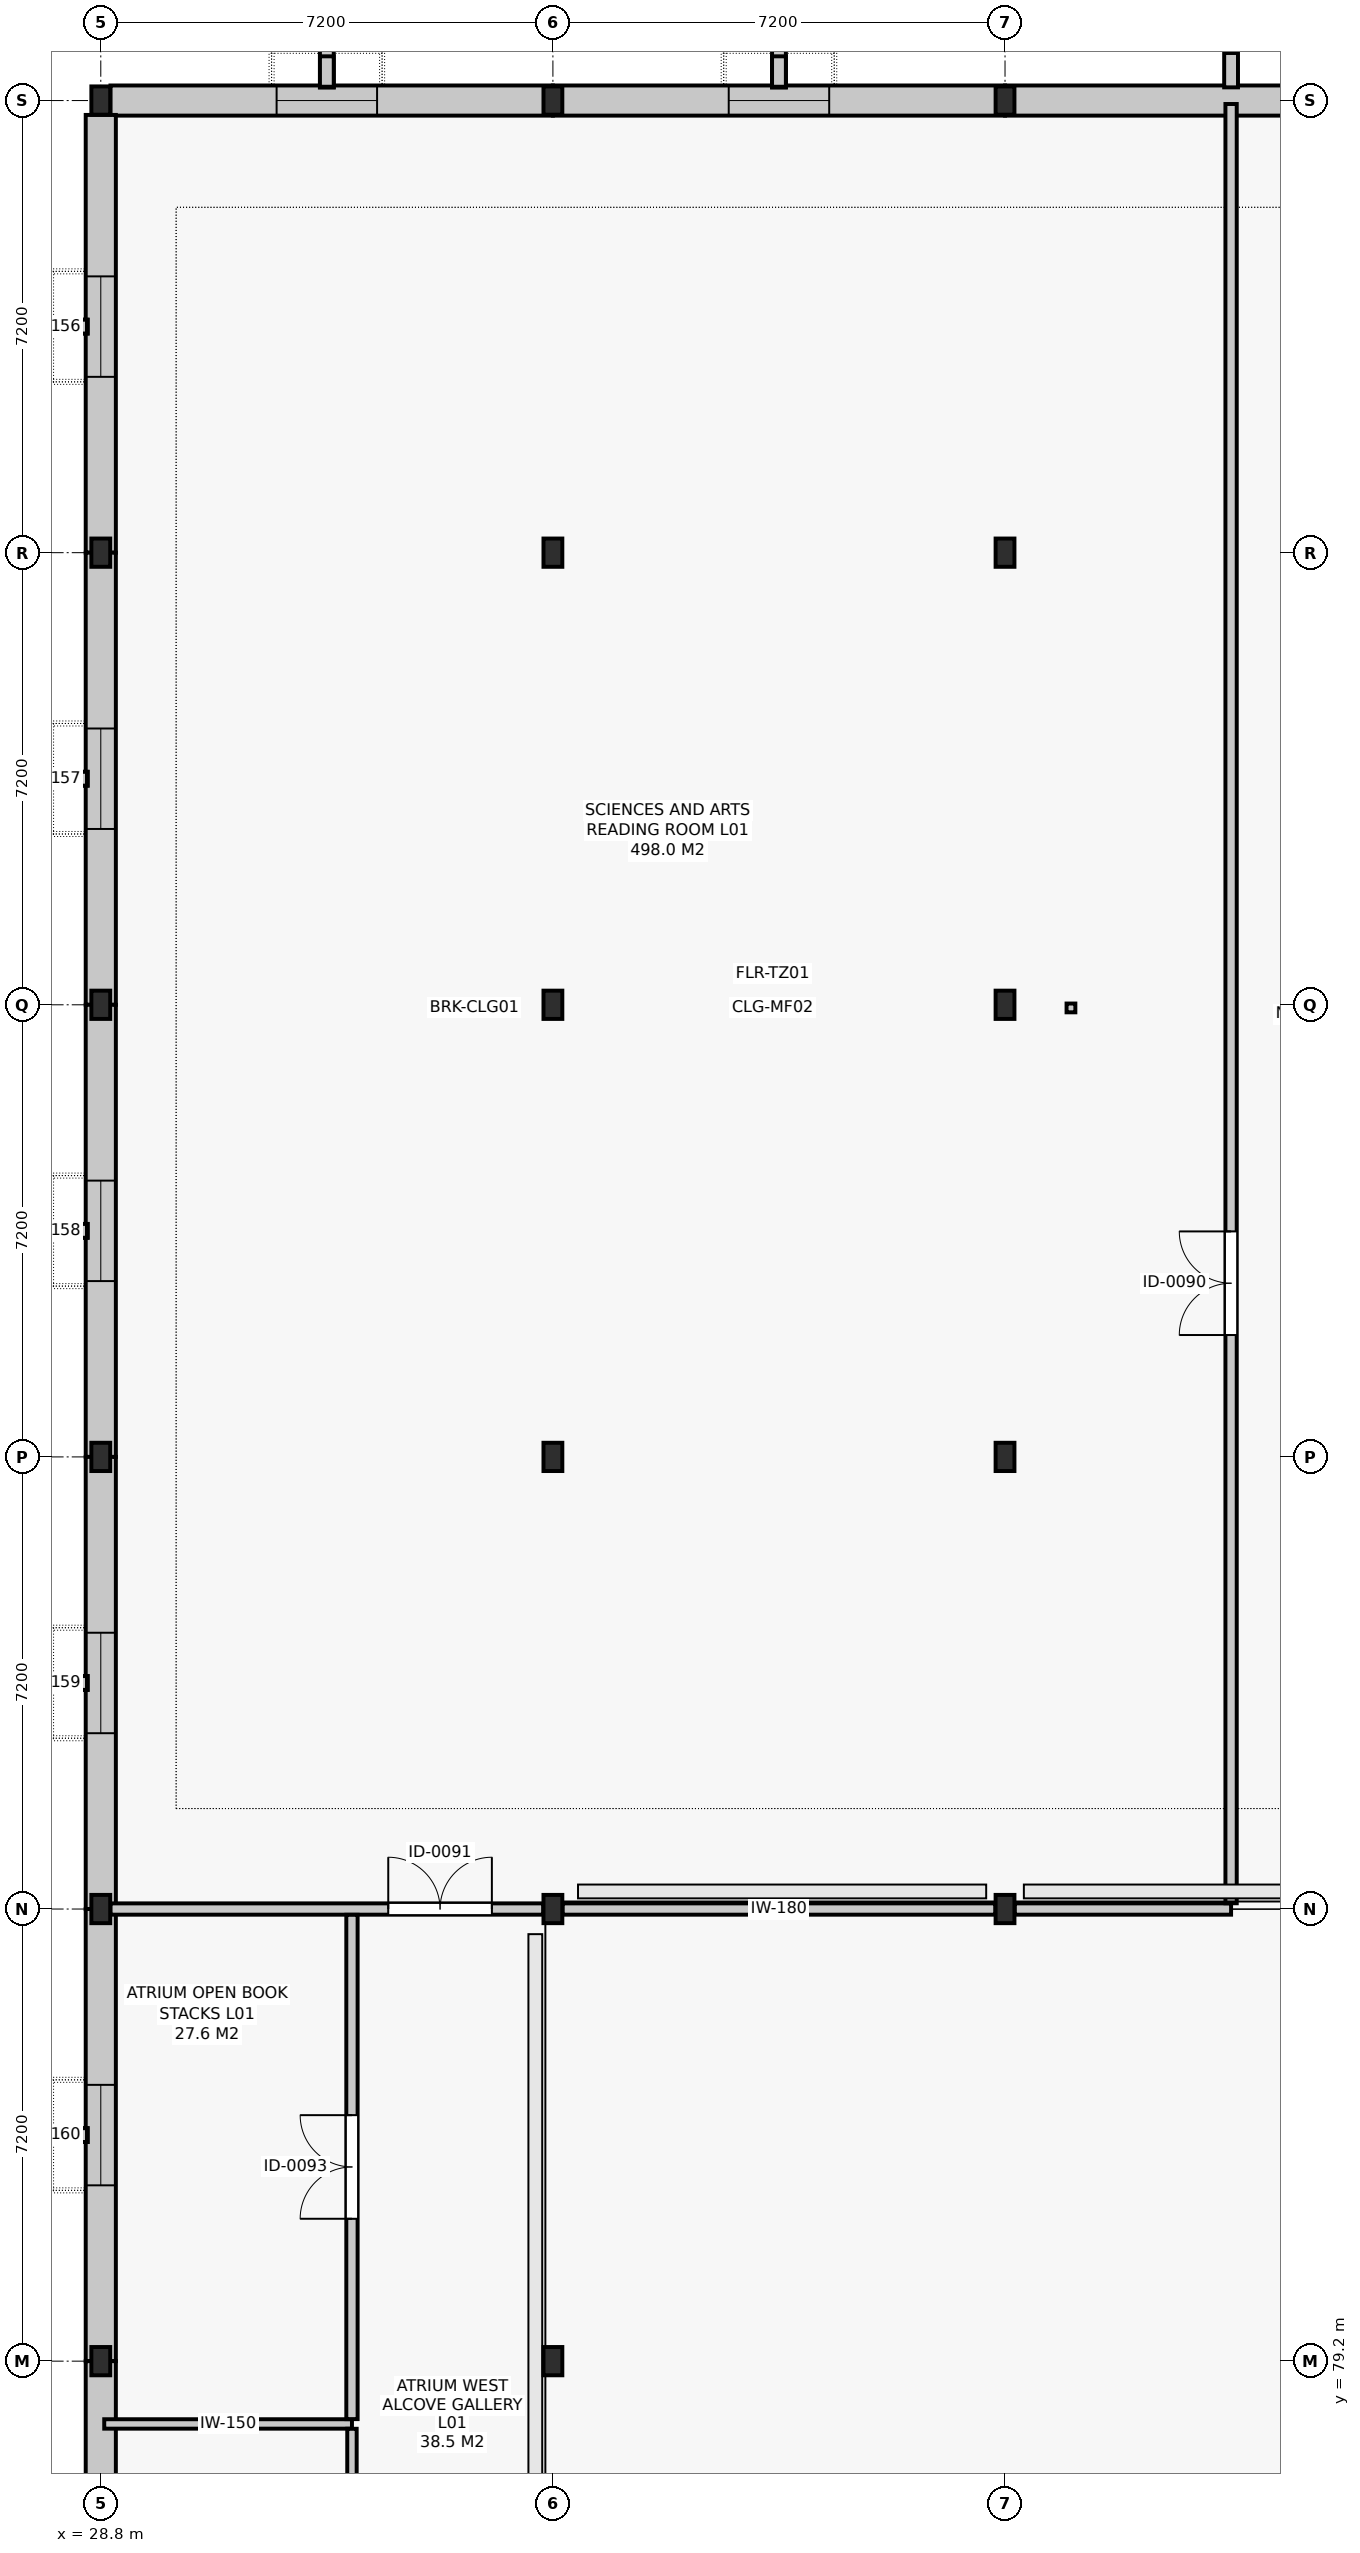
"""IFC4 building model, lengths in metres.
Left out: names, types, materials, properties, quantities, classifications, styles, units other than length and angle.
Written with IfcOpenShell. Run it as: python <this file> out.ifc"""

import sys

from ifc_helpers import new_model, si_unit, direction, frame, frame_2d, origin, origin_2d, place, context, subcontext, project, spatial, rectangle, i_section, extrude, element, fill, save


model = new_model("IFC4")
c1 = context("Model", 3, precision=1e-05, world=origin(), true_north=direction((0.0, 1.0)))
c2 = subcontext(c1, "Body", "Model", "MODEL_VIEW")
j1 = project(units=[si_unit("LENGTHUNIT", "METRE"), si_unit("PLANEANGLEUNIT", "RADIAN")], contexts=[c1])
p1 = place(None, origin())
s1 = spatial("IfcSite", under=j1, at=p1, CompositionType="ELEMENT")
p2 = place(p1, origin())
s2 = spatial("IfcBuilding", under=s1, at=p2, CompositionType="ELEMENT")
p3 = place(p2, frame((0.0, 0.0, 5.4)))
s3 = spatial("IfcBuildingStorey", under=s2, at=p3, CompositionType="ELEMENT", Elevation=5.4)
for number, where, z_axis, x_axis in (
    (1, (28.8, 79.2, 0.0), (0.0, 0.0, 1.0), (1.0, 0.0, 0.0)),
    (2, (28.8, 86.4, 0.0), (0.0, 0.0, 1.0), (1.0, 0.0, 0.0)),
    (3, (28.8, 93.6, 0.0), (0.0, 0.0, 1.0), (1.0, 0.0, 0.0)),
    (4, (28.8, 100.8, 0.0), (0.0, 0.0, 1.0), (1.0, 0.0, 0.0)),
    (5, (28.8, 108.0, 0.0), (0.0, 0.0, 1.0), (1.0, 0.0, 0.0)),
    (6, (28.8, 115.2, 0.0), (0.0, 0.0, 1.0), (1.0, 0.0, 0.0)),
    (7, (36.0, 79.2, 0.0), (0.0, 0.0, 1.0), (1.0, 0.0, 0.0)),
    (8, (36.0, 86.4, 0.0), (0.0, 0.0, 1.0), (1.0, 0.0, 0.0)),
    (9, (36.0, 93.6, 0.0), (0.0, 0.0, 1.0), (1.0, 0.0, 0.0)),
    (10, (36.0, 100.8, 0.0), (0.0, 0.0, 1.0), (1.0, 0.0, 0.0)),
    (11, (36.0, 108.0, 0.0), (0.0, 0.0, 1.0), (1.0, 0.0, 0.0)),
    (12, (36.0, 115.2, 0.0), (0.0, 0.0, 1.0), (1.0, 0.0, 0.0)),
    (13, (43.2, 86.4, 0.0), (0.0, 0.0, 1.0), (1.0, 0.0, 0.0)),
    (14, (43.2, 93.6, 0.0), (0.0, 0.0, 1.0), (1.0, 0.0, 0.0)),
    (15, (43.2, 100.8, 0.0), (0.0, 0.0, 1.0), (1.0, 0.0, 0.0)),
    (16, (43.2, 108.0, 0.0), (0.0, 0.0, 1.0), (1.0, 0.0, 0.0)),
    (17, (43.2, 115.2, 0.0), (0.0, 0.0, 1.0), (1.0, 0.0, 0.0)),
):
    element("IfcColumn", number, at=place(p3, frame(where, z_axis=z_axis, x_axis=x_axis)), inside=s3, PredefinedType="COLUMN", context=c2, shape_type="SweptSolid", body=[
        extrude(i_section(OverallWidth=0.3, OverallDepth=0.45, WebThickness=0.014, FlangeThickness=0.026, FilletRadius=0.027, at=origin_2d()), origin(), (0.0, 0.0, 1.0), 4.8),
    ])
p4 = place(p3, frame((50.4, 115.2, 0.0), z_axis=(0.0, 0.0, 1.0), x_axis=(-1.0, 0.0, 0.0)))
e18 = element("IfcWall", 18, at=p4, inside=s3, PredefinedType="SOLIDWALL", context=c2, shape_type="SweptSolid", body=[
    extrude(rectangle(XDim=7.2, YDim=0.48, at=frame_2d((3.6, 0.0))), origin(), (0.0, 0.0, 1.0), 3.8),
])
p5 = place(p3, frame((43.2, 115.2, 0.0), z_axis=(0.0, 0.0, 1.0), x_axis=(-1.0, 0.0, 0.0)))
e19 = element("IfcWall", 19, at=p5, inside=s3, PredefinedType="SOLIDWALL", context=c2, shape_type="SweptSolid", body=[
    extrude(rectangle(XDim=7.2, YDim=0.48, at=frame_2d((3.6, 0.0))), origin(), (0.0, 0.0, 1.0), 3.8),
])
p6 = place(p5, frame((2.8, 0.0, 0.95)))
e20 = element("IfcOpeningElement", 20, at=p6, cuts=e19, PredefinedType="OPENING", context=c2, shape_type="SweptSolid", body=[
    extrude(rectangle(XDim=1.6, YDim=2.2, at=frame_2d((0.8, 1.1))), frame((0.0, 0.252, 0.0), z_axis=(0.0, -1.0, 0.0), x_axis=(1.0, 0.0, 0.0)), (0.0, 0.0, 1.0), 0.504),
])
p7 = place(p3, frame((36.0, 115.2, 0.0), z_axis=(0.0, 0.0, 1.0), x_axis=(-1.0, 0.0, 0.0)))
e21 = element("IfcWall", 21, at=p7, inside=s3, PredefinedType="SOLIDWALL", context=c2, shape_type="SweptSolid", body=[
    extrude(rectangle(XDim=7.046, YDim=0.48, at=frame_2d((3.523, 0.0))), origin(), (0.0, 0.0, 1.0), 3.8),
])
p8 = place(p7, frame((2.8, 0.0, 0.95)))
e22 = element("IfcOpeningElement", 22, at=p8, cuts=e21, PredefinedType="OPENING", context=c2, shape_type="SweptSolid", body=[
    extrude(rectangle(XDim=1.6, YDim=2.2, at=frame_2d((0.8, 1.1))), frame((0.0, 0.252, 0.0), z_axis=(0.0, -1.0, 0.0), x_axis=(1.0, 0.0, 0.0)), (0.0, 0.0, 1.0), 0.504),
])
p9 = place(p3, frame((28.8, 114.971, 0.0), z_axis=(0.0, 0.0, 1.0), x_axis=(0.0, -1.0, 0.0)))
e23 = element("IfcWall", 23, at=p9, inside=s3, PredefinedType="SOLIDWALL", context=c2, shape_type="SweptSolid", body=[
    extrude(rectangle(XDim=6.971, YDim=0.48, at=frame_2d((3.485, 0.0))), origin(), (0.0, 0.0, 1.0), 3.8),
])
p10 = place(p9, frame((2.571, 0.0, 0.95)))
e24 = element("IfcOpeningElement", 24, at=p10, cuts=e23, PredefinedType="OPENING", context=c2, shape_type="SweptSolid", body=[
    extrude(rectangle(XDim=1.6, YDim=2.2, at=frame_2d((0.8, 1.1))), frame((0.0, 0.252, 0.0), z_axis=(0.0, -1.0, 0.0), x_axis=(1.0, 0.0, 0.0)), (0.0, 0.0, 1.0), 0.504),
])
p11 = place(p3, frame((28.8, 108.0, 0.0), z_axis=(0.0, 0.0, 1.0), x_axis=(0.0, -1.0, 0.0)))
e25 = element("IfcWall", 25, at=p11, inside=s3, PredefinedType="SOLIDWALL", context=c2, shape_type="SweptSolid", body=[
    extrude(rectangle(XDim=7.2, YDim=0.48, at=frame_2d((3.6, 0.0))), origin(), (0.0, 0.0, 1.0), 3.8),
])
p12 = place(p11, frame((2.8, 0.0, 0.95)))
e26 = element("IfcOpeningElement", 26, at=p12, cuts=e25, PredefinedType="OPENING", context=c2, shape_type="SweptSolid", body=[
    extrude(rectangle(XDim=1.6, YDim=2.2, at=frame_2d((0.8, 1.1))), frame((0.0, 0.252, 0.0), z_axis=(0.0, -1.0, 0.0), x_axis=(1.0, 0.0, 0.0)), (0.0, 0.0, 1.0), 0.504),
])
p13 = place(p3, frame((28.8, 100.8, 0.0), z_axis=(0.0, 0.0, 1.0), x_axis=(0.0, -1.0, 0.0)))
e27 = element("IfcWall", 27, at=p13, inside=s3, PredefinedType="SOLIDWALL", context=c2, shape_type="SweptSolid", body=[
    extrude(rectangle(XDim=7.2, YDim=0.48, at=frame_2d((3.6, 0.0))), origin(), (0.0, 0.0, 1.0), 3.8),
])
p14 = place(p13, frame((2.8, 0.0, 0.95)))
e28 = element("IfcOpeningElement", 28, at=p14, cuts=e27, PredefinedType="OPENING", context=c2, shape_type="SweptSolid", body=[
    extrude(rectangle(XDim=1.6, YDim=2.2, at=frame_2d((0.8, 1.1))), frame((0.0, 0.252, 0.0), z_axis=(0.0, -1.0, 0.0), x_axis=(1.0, 0.0, 0.0)), (0.0, 0.0, 1.0), 0.504),
])
p15 = place(p3, frame((28.8, 93.6, 0.0), z_axis=(0.0, 0.0, 1.0), x_axis=(0.0, -1.0, 0.0)))
e29 = element("IfcWall", 29, at=p15, inside=s3, PredefinedType="SOLIDWALL", context=c2, shape_type="SweptSolid", body=[
    extrude(rectangle(XDim=7.2, YDim=0.48, at=frame_2d((3.6, 0.0))), origin(), (0.0, 0.0, 1.0), 3.8),
])
p16 = place(p15, frame((2.8, 0.0, 0.95)))
e30 = element("IfcOpeningElement", 30, at=p16, cuts=e29, PredefinedType="OPENING", context=c2, shape_type="SweptSolid", body=[
    extrude(rectangle(XDim=1.6, YDim=2.2, at=frame_2d((0.8, 1.1))), frame((0.0, 0.252, 0.0), z_axis=(0.0, -1.0, 0.0), x_axis=(1.0, 0.0, 0.0)), (0.0, 0.0, 1.0), 0.504),
])
p17 = place(p3, frame((28.8, 86.4, 0.0), z_axis=(0.0, 0.0, 1.0), x_axis=(0.0, -1.0, 0.0)))
e31 = element("IfcWall", 31, at=p17, inside=s3, PredefinedType="SOLIDWALL", context=c2, shape_type="SweptSolid", body=[
    extrude(rectangle(XDim=7.2, YDim=0.48, at=frame_2d((3.6, 0.0))), origin(), (0.0, 0.0, 1.0), 3.8),
])
p18 = place(p17, frame((2.8, 0.0, 0.95)))
e32 = element("IfcOpeningElement", 32, at=p18, cuts=e31, PredefinedType="OPENING", context=c2, shape_type="SweptSolid", body=[
    extrude(rectangle(XDim=1.6, YDim=2.2, at=frame_2d((0.8, 1.1))), frame((0.0, 0.252, 0.0), z_axis=(0.0, -1.0, 0.0), x_axis=(1.0, 0.0, 0.0)), (0.0, 0.0, 1.0), 0.504),
])
p19 = place(p3, frame((28.8, 79.2, 0.0), z_axis=(0.0, 0.0, 1.0), x_axis=(0.0, -1.0, 0.0)))
e33 = element("IfcWall", 33, at=p19, inside=s3, PredefinedType="SOLIDWALL", context=c2, shape_type="SweptSolid", body=[
    extrude(rectangle(XDim=7.2, YDim=0.48, at=frame_2d((3.6, 0.0))), origin(), (0.0, 0.0, 1.0), 3.8),
])
p20 = place(p19, frame((2.8, 0.0, 0.95)))
e34 = element("IfcOpeningElement", 34, at=p20, cuts=e33, PredefinedType="OPENING", context=c2, shape_type="SweptSolid", body=[
    extrude(rectangle(XDim=1.6, YDim=2.2, at=frame_2d((0.8, 1.1))), frame((0.0, 0.252, 0.0), z_axis=(0.0, -1.0, 0.0), x_axis=(1.0, 0.0, 0.0)), (0.0, 0.0, 1.0), 0.504),
])
p21 = place(p3, frame((28.855, 78.2, 0.0), z_axis=(0.0, 0.0, 1.0), x_axis=(1.0, 0.0, 0.0)))
e35 = element("IfcWall", 35, at=p21, inside=s3, PredefinedType="PARTITIONING", context=c2, shape_type="SweptSolid", body=[
    extrude(rectangle(XDim=3.945, YDim=0.15, at=frame_2d((1.973, 0.0))), origin(), (0.0, 0.0, 1.0), 3.955),
])
p22 = place(p3, frame((28.954, 86.4, 0.0), z_axis=(0.0, 0.0, 1.0), x_axis=(1.0, 0.0, 0.0)))
e36 = element("IfcWall", 36, at=p22, inside=s3, PredefinedType="PARTITIONING", context=c2, shape_type="SweptSolid", body=[
    extrude(rectangle(XDim=6.892, YDim=0.18, at=frame_2d((3.446, 0.0))), origin(), (0.0, 0.0, 1.0), 4.065),
])
p23 = place(p22, frame((4.424, 0.0, 0.0)))
e37 = element("IfcOpeningElement", 37, at=p23, cuts=e36, PredefinedType="OPENING", context=c2, shape_type="SweptSolid", body=[
    extrude(rectangle(XDim=1.65, YDim=2.25, at=frame_2d((0.825, 1.125))), frame((0.0, 0.102, 0.0), z_axis=(0.0, -1.0, 0.0), x_axis=(1.0, 0.0, 0.0)), (0.0, 0.0, 1.0), 0.204),
])
p24 = place(p3, frame((36.154, 86.4, 0.0), z_axis=(0.0, 0.0, 1.0), x_axis=(1.0, 0.0, 0.0)))
e38 = element("IfcWall", 38, at=p24, inside=s3, PredefinedType="PARTITIONING", context=c2, shape_type="SweptSolid", body=[
    extrude(rectangle(XDim=6.892, YDim=0.18, at=frame_2d((3.446, 0.0))), origin(), (0.0, 0.0, 1.0), 4.505),
])
p25 = place(p3, frame((43.354, 86.4, 0.0), z_axis=(0.0, 0.0, 1.0), x_axis=(1.0, 0.0, 0.0)))
e39 = element("IfcWall", 39, at=p25, inside=s3, PredefinedType="PARTITIONING", context=c2, shape_type="SweptSolid", body=[
    extrude(rectangle(XDim=3.446, YDim=0.18, at=frame_2d((1.723, 0.0))), origin(), (0.0, 0.0, 1.0), 4.505),
])
p26 = place(p3, frame((32.8, 72.077, 0.0), z_axis=(0.0, 0.0, 1.0), x_axis=(0.0, 1.0, 0.0)))
e40 = element("IfcWall", 40, at=p26, inside=s3, PredefinedType="PARTITIONING", context=c2, shape_type="SweptSolid", body=[
    extrude(rectangle(XDim=6.046, YDim=0.15, at=frame_2d((3.023, 0.0))), origin(), (0.0, 0.0, 1.0), 4.065),
])
p27 = place(p26, frame((2.533, 0.0, 0.0)))
e41 = element("IfcOpeningElement", 41, at=p27, cuts=e40, PredefinedType="OPENING", context=c2, shape_type="SweptSolid", body=[
    extrude(rectangle(XDim=0.98, YDim=2.1, at=frame_2d((0.49, 1.05))), frame((0.0, 0.087, 0.0), z_axis=(0.0, -1.0, 0.0), x_axis=(1.0, 0.0, 0.0)), (0.0, 0.0, 1.0), 0.174),
])
p28 = place(p3, frame((46.8, 86.492, 0.0), z_axis=(0.0, 0.0, 1.0), x_axis=(0.0, 1.0, 0.0)))
e42 = element("IfcWall", 42, at=p28, inside=s3, PredefinedType="PARTITIONING", context=c2, shape_type="SweptSolid", body=[
    extrude(rectangle(XDim=28.653, YDim=0.18, at=frame_2d((14.327, 0.0))), origin(), (0.0, 0.0, 1.0), 3.955),
])
p29 = place(p28, frame((9.049, 0.0, 0.0)))
e43 = element("IfcOpeningElement", 43, at=p29, cuts=e42, PredefinedType="OPENING", context=c2, shape_type="SweptSolid", body=[
    extrude(rectangle(XDim=1.65, YDim=2.25, at=frame_2d((0.825, 1.125))), frame((0.0, 0.102, 0.0), z_axis=(0.0, -1.0, 0.0), x_axis=(1.0, 0.0, 0.0)), (0.0, 0.0, 1.0), 0.204),
])
p30 = place(p3, frame((32.8, 78.277, 0.0), z_axis=(0.0, 0.0, 1.0), x_axis=(0.0, 1.0, 0.0)))
e44 = element("IfcWall", 44, at=p30, inside=s3, PredefinedType="PARTITIONING", context=c2, shape_type="SweptSolid", body=[
    extrude(rectangle(XDim=8.031, YDim=0.18, at=frame_2d((4.016, 0.0))), origin(), (0.0, 0.0, 1.0), 4.065),
])
p31 = place(p30, frame((3.19, 0.0, 0.0)))
e45 = element("IfcOpeningElement", 45, at=p31, cuts=e44, PredefinedType="OPENING", context=c2, shape_type="SweptSolid", body=[
    extrude(rectangle(XDim=1.65, YDim=2.25, at=frame_2d((0.825, 1.125))), frame((0.0, 0.102, 0.0), z_axis=(0.0, -1.0, 0.0), x_axis=(1.0, 0.0, 0.0)), (0.0, 0.0, 1.0), 0.204),
])
p32 = place(p6, origin())
e46 = element("IfcWindow", 46, at=p32, inside=s3, PartitioningType="SINGLE_PANEL", PredefinedType="WINDOW", context=c2, shape_type="SweptSolid", body=[
    extrude(rectangle(XDim=1.6, YDim=2.2, at=frame_2d((0.8, 1.1))), frame((0.0, 0.03, 0.0), z_axis=(0.0, -1.0, 0.0), x_axis=(1.0, 0.0, 0.0)), (0.0, 0.0, 1.0), 0.06),
])
fill(e20, e46)
p33 = place(p8, origin())
e47 = element("IfcWindow", 47, at=p33, inside=s3, PartitioningType="SINGLE_PANEL", PredefinedType="WINDOW", context=c2, shape_type="SweptSolid", body=[
    extrude(rectangle(XDim=1.6, YDim=2.2, at=frame_2d((0.8, 1.1))), frame((0.0, 0.03, 0.0), z_axis=(0.0, -1.0, 0.0), x_axis=(1.0, 0.0, 0.0)), (0.0, 0.0, 1.0), 0.06),
])
fill(e22, e47)
p34 = place(p10, origin())
e48 = element("IfcWindow", 48, at=p34, inside=s3, PartitioningType="SINGLE_PANEL", PredefinedType="WINDOW", context=c2, shape_type="SweptSolid", body=[
    extrude(rectangle(XDim=1.6, YDim=2.2, at=frame_2d((0.8, 1.1))), frame((0.0, 0.03, 0.0), z_axis=(0.0, -1.0, 0.0), x_axis=(1.0, 0.0, 0.0)), (0.0, 0.0, 1.0), 0.06),
])
fill(e24, e48)
p35 = place(p12, origin())
e49 = element("IfcWindow", 49, at=p35, inside=s3, PartitioningType="SINGLE_PANEL", PredefinedType="WINDOW", context=c2, shape_type="SweptSolid", body=[
    extrude(rectangle(XDim=1.6, YDim=2.2, at=frame_2d((0.8, 1.1))), frame((0.0, 0.03, 0.0), z_axis=(0.0, -1.0, 0.0), x_axis=(1.0, 0.0, 0.0)), (0.0, 0.0, 1.0), 0.06),
])
fill(e26, e49)
p36 = place(p14, origin())
e50 = element("IfcWindow", 50, at=p36, inside=s3, PartitioningType="SINGLE_PANEL", PredefinedType="WINDOW", context=c2, shape_type="SweptSolid", body=[
    extrude(rectangle(XDim=1.6, YDim=2.2, at=frame_2d((0.8, 1.1))), frame((0.0, 0.03, 0.0), z_axis=(0.0, -1.0, 0.0), x_axis=(1.0, 0.0, 0.0)), (0.0, 0.0, 1.0), 0.06),
])
fill(e28, e50)
p37 = place(p16, origin())
e51 = element("IfcWindow", 51, at=p37, inside=s3, PartitioningType="SINGLE_PANEL", PredefinedType="WINDOW", context=c2, shape_type="SweptSolid", body=[
    extrude(rectangle(XDim=1.6, YDim=2.2, at=frame_2d((0.8, 1.1))), frame((0.0, 0.03, 0.0), z_axis=(0.0, -1.0, 0.0), x_axis=(1.0, 0.0, 0.0)), (0.0, 0.0, 1.0), 0.06),
])
fill(e30, e51)
p38 = place(p18, origin())
e52 = element("IfcWindow", 52, at=p38, inside=s3, PartitioningType="SINGLE_PANEL", PredefinedType="WINDOW", context=c2, shape_type="SweptSolid", body=[
    extrude(rectangle(XDim=1.6, YDim=2.2, at=frame_2d((0.8, 1.1))), frame((0.0, 0.03, 0.0), z_axis=(0.0, -1.0, 0.0), x_axis=(1.0, 0.0, 0.0)), (0.0, 0.0, 1.0), 0.06),
])
fill(e32, e52)
p39 = place(p29, origin())
e53 = element("IfcDoor", 53, at=p39, inside=s3, OperationType="DOUBLE_DOOR_SINGLE_SWING", PredefinedType="DOOR", context=c2, shape_type="SweptSolid", body=[
    extrude(rectangle(XDim=1.65, YDim=2.25, at=frame_2d((0.825, 1.125))), frame((0.0, 0.025, 0.0), z_axis=(0.0, -1.0, 0.0), x_axis=(1.0, 0.0, 0.0)), (0.0, 0.0, 1.0), 0.05),
])
fill(e43, e53)
p40 = place(p23, origin())
e54 = element("IfcDoor", 54, at=p40, inside=s3, OperationType="DOUBLE_DOOR_SINGLE_SWING", PredefinedType="DOOR", context=c2, shape_type="SweptSolid", body=[
    extrude(rectangle(XDim=1.65, YDim=2.25, at=frame_2d((0.825, 1.125))), frame((0.0, 0.025, 0.0), z_axis=(0.0, -1.0, 0.0), x_axis=(1.0, 0.0, 0.0)), (0.0, 0.0, 1.0), 0.05),
])
fill(e37, e54)
p41 = place(p31, origin())
e55 = element("IfcDoor", 55, at=p41, inside=s3, OperationType="DOUBLE_DOOR_SINGLE_SWING", PredefinedType="DOOR", context=c2, shape_type="SweptSolid", body=[
    extrude(rectangle(XDim=1.65, YDim=2.25, at=frame_2d((0.825, 1.125))), frame((0.0, 0.025, 0.0), z_axis=(0.0, -1.0, 0.0), x_axis=(1.0, 0.0, 0.0)), (0.0, 0.0, 1.0), 0.05),
])
fill(e45, e55)
save(model, sys.argv[1])
